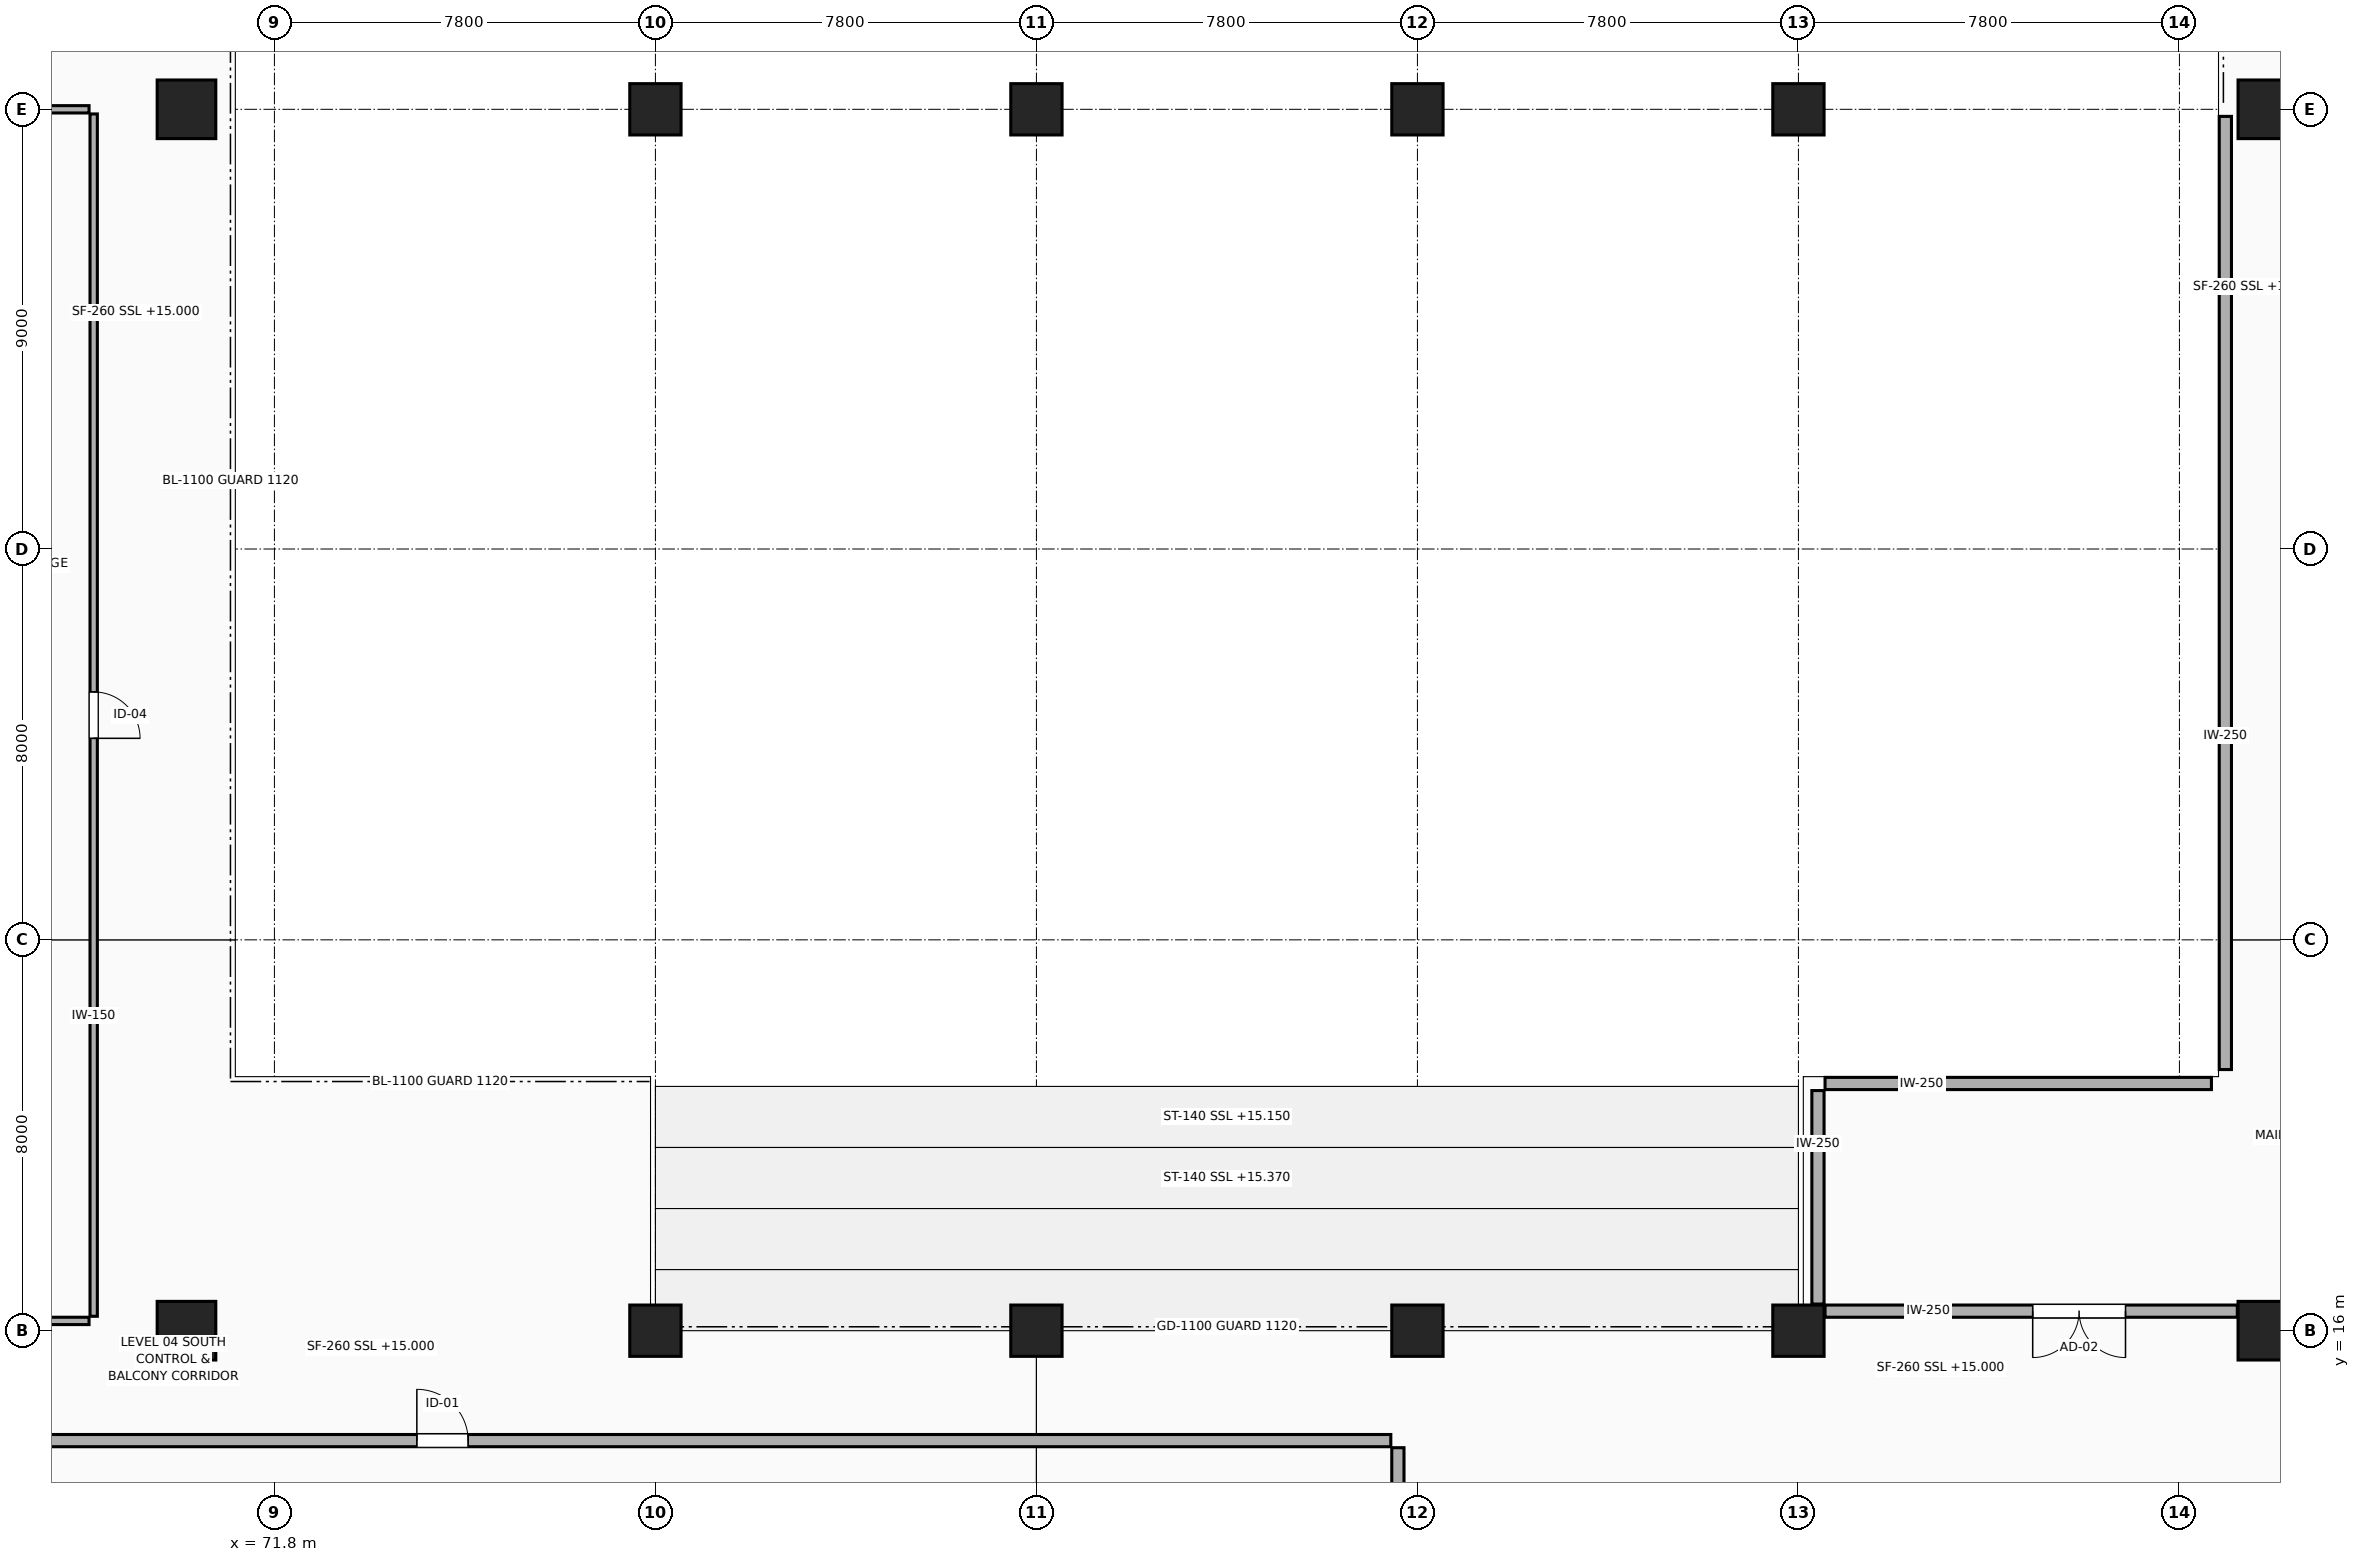
"""IFC4 building model, lengths in metres.
Left out: names, types, materials, properties, quantities, classifications, styles, units other than length and angle.
Written with IfcOpenShell. Run it as: python <this file> out.ifc"""

import sys

from ifc_helpers import new_model, si_unit, direction, frame, frame_2d, origin, origin_2d, place, context, subcontext, project, spatial, rectangle, extrude, element, fill, save


model = new_model("IFC4")
c1 = context("Model", 3, precision=1e-05, world=origin(), true_north=direction((0.0, 1.0)))
c2 = subcontext(c1, "Body", "Model", "MODEL_VIEW")
j1 = project(units=[si_unit("LENGTHUNIT", "METRE"), si_unit("PLANEANGLEUNIT", "RADIAN")], contexts=[c1])
p1 = place(None, origin())
s1 = spatial("IfcSite", under=j1, at=p1, CompositionType="ELEMENT")
p2 = place(p1, origin())
s2 = spatial("IfcBuilding", under=s1, at=p2, CompositionType="ELEMENT")
p3 = place(p2, frame((0.0, 0.0, 15.0)))
s3 = spatial("IfcBuildingStorey", under=s2, at=p3, CompositionType="ELEMENT", Elevation=15.0)
for number, where, z_axis, x_axis in (
    (1, (70.0, 16.0, 0.0), (0.0, 0.0, 1.0), (1.0, 0.0, 0.0)),
    (2, (70.0, 41.0, 0.0), (0.0, 0.0, 1.0), (1.0, 0.0, 0.0)),
):
    element("IfcColumn", number, at=place(p3, frame(where, z_axis=z_axis, x_axis=x_axis)), inside=s3, PredefinedType="COLUMN", context=c2, shape_type="SweptSolid", body=[
        extrude(rectangle(XDim=1.2, YDim=1.2, at=origin_2d()), origin(), (0.0, 0.0, 1.0), 4.8),
    ])
for number, where, z_axis, x_axis in (
    (3, (79.6, 16.0, 0.0), (0.0, 0.0, 1.0), (1.0, 0.0, 0.0)),
    (4, (79.6, 41.0, 0.0), (0.0, 0.0, 1.0), (1.0, 0.0, 0.0)),
    (5, (87.4, 16.0, 0.0), (0.0, 0.0, 1.0), (1.0, 0.0, 0.0)),
    (6, (87.4, 41.0, 0.0), (0.0, 0.0, 1.0), (1.0, 0.0, 0.0)),
    (7, (95.2, 16.0, 0.0), (0.0, 0.0, 1.0), (1.0, 0.0, 0.0)),
    (8, (95.2, 41.0, 0.0), (0.0, 0.0, 1.0), (1.0, 0.0, 0.0)),
    (9, (103.0, 16.0, 0.0), (0.0, 0.0, 1.0), (1.0, 0.0, 0.0)),
    (10, (103.0, 41.0, 0.0), (0.0, 0.0, 1.0), (1.0, 0.0, 0.0)),
):
    element("IfcColumn", number, at=place(p3, frame(where, z_axis=z_axis, x_axis=x_axis)), inside=s3, PredefinedType="COLUMN", context=c2, shape_type="SweptSolid", body=[
        extrude(rectangle(XDim=1.05, YDim=1.05, at=origin_2d()), origin(), (0.0, 0.0, 1.0), 4.8),
    ])
for number, where, z_axis, x_axis in (
    (11, (112.6, 16.0, 0.0), (0.0, 0.0, 1.0), (1.0, 0.0, 0.0)),
    (12, (112.6, 41.0, 0.0), (0.0, 0.0, 1.0), (1.0, 0.0, 0.0)),
):
    element("IfcColumn", number, at=place(p3, frame(where, z_axis=z_axis, x_axis=x_axis)), inside=s3, PredefinedType="COLUMN", context=c2, shape_type="SweptSolid", body=[
        extrude(rectangle(XDim=1.2, YDim=1.2, at=origin_2d()), origin(), (0.0, 0.0, 1.0), 4.8),
    ])
p4 = place(p3, frame((111.985, 16.4, 0.0), z_axis=(0.0, 0.0, 1.0), x_axis=(-1.0, 0.0, 0.0)))
e13 = element("IfcWall", 13, at=p4, inside=s3, PredefinedType="PARTITIONING", context=c2, shape_type="SweptSolid", body=[
    extrude(rectangle(XDim=8.44, YDim=0.25, at=frame_2d((4.22, 0.0))), origin(), (0.0, 0.0, 1.0), 3.68),
])
p5 = place(p4, frame((2.289, 0.0, 0.0)))
e14 = element("IfcOpeningElement", 14, at=p5, cuts=e13, PredefinedType="OPENING", context=c2, shape_type="SweptSolid", body=[
    extrude(rectangle(XDim=1.9, YDim=2.35, at=frame_2d((0.95, 1.175))), frame((0.0, 0.135, 0.0), z_axis=(0.0, -1.0, 0.0), x_axis=(1.0, 0.0, 0.0)), (0.0, 0.0, 1.0), 0.27),
])
p6 = place(p3, frame((103.4, 16.545, 0.0), z_axis=(0.0, 0.0, 1.0), x_axis=(0.0, 1.0, 0.0)))
e15 = element("IfcWall", 15, at=p6, inside=s3, PredefinedType="PARTITIONING", context=c2, shape_type="SweptSolid", body=[
    extrude(rectangle(XDim=4.37, YDim=0.25, at=frame_2d((2.185, 0.0))), origin(), (0.0, 0.0, 1.0), 4.54),
])
p7 = place(p3, frame((103.545, 21.06, 0.0), z_axis=(0.0, 0.0, 1.0), x_axis=(1.0, 0.0, 0.0)))
e16 = element("IfcWall", 16, at=p7, inside=s3, PredefinedType="PARTITIONING", context=c2, shape_type="SweptSolid", body=[
    extrude(rectangle(XDim=7.91, YDim=0.25, at=frame_2d((3.955, 0.0))), origin(), (0.0, 0.0, 1.0), 4.54),
])
p8 = place(p3, frame((111.74, 21.345, 0.0), z_axis=(0.0, 0.0, 1.0), x_axis=(0.0, 1.0, 0.0)))
e17 = element("IfcWall", 17, at=p8, inside=s3, PredefinedType="PARTITIONING", context=c2, shape_type="SweptSolid", body=[
    extrude(rectangle(XDim=19.51, YDim=0.25, at=frame_2d((9.755, 0.0))), origin(), (0.0, 0.0, 1.0), 4.54),
])
p9 = place(p3, frame((94.8, 13.605, 0.0), z_axis=(0.0, 0.0, 1.0), x_axis=(0.0, -1.0, 0.0)))
e18 = element("IfcWall", 18, at=p9, inside=s3, PredefinedType="PARTITIONING", context=c2, shape_type="SweptSolid", body=[
    extrude(rectangle(XDim=3.231, YDim=0.25, at=frame_2d((1.615, 0.0))), origin(), (0.0, 0.0, 1.0), 4.54),
])
p10 = place(p3, frame((64.374, 13.75, 0.0), z_axis=(0.0, 0.0, 1.0), x_axis=(1.0, 0.0, 0.0)))
e19 = element("IfcWall", 19, at=p10, inside=s3, PredefinedType="PARTITIONING", context=c2, shape_type="SweptSolid", body=[
    extrude(rectangle(XDim=30.281, YDim=0.25, at=frame_2d((15.141, 0.0))), origin(), (0.0, 0.0, 1.0), 4.54),
])
p11 = place(p10, frame((10.342, 0.0, 0.0)))
e20 = element("IfcOpeningElement", 20, at=p11, cuts=e19, PredefinedType="OPENING", context=c2, shape_type="SweptSolid", body=[
    extrude(rectangle(XDim=1.05, YDim=2.15, at=frame_2d((0.525, 1.075))), frame((0.0, 0.135, 0.0), z_axis=(0.0, -1.0, 0.0), x_axis=(1.0, 0.0, 0.0)), (0.0, 0.0, 1.0), 0.27),
])
p12 = place(p3, frame((68.1, 40.905, 0.0), z_axis=(0.0, 0.0, 1.0), x_axis=(0.0, -1.0, 0.0)))
e21 = element("IfcWall", 21, at=p12, inside=s3, PredefinedType="PARTITIONING", context=c2, shape_type="SweptSolid", body=[
    extrude(rectangle(XDim=24.61, YDim=0.15, at=frame_2d((12.305, 0.0))), origin(), (0.0, 0.0, 1.0), 4.54),
])
p13 = place(p12, frame((11.83, 0.0, 0.0)))
e22 = element("IfcOpeningElement", 22, at=p13, cuts=e21, PredefinedType="OPENING", context=c2, shape_type="SweptSolid", body=[
    extrude(rectangle(XDim=0.95, YDim=2.15, at=frame_2d((0.475, 1.075))), frame((0.0, 0.085, 0.0), z_axis=(0.0, -1.0, 0.0), x_axis=(1.0, 0.0, 0.0)), (0.0, 0.0, 1.0), 0.17),
])
p14 = place(p3, frame((68.005, 16.2, 0.0), z_axis=(0.0, 0.0, 1.0), x_axis=(-1.0, 0.0, 0.0)))
e23 = element("IfcWall", 23, at=p14, inside=s3, PredefinedType="PARTITIONING", context=c2, shape_type="SweptSolid", body=[
    extrude(rectangle(XDim=4.121, YDim=0.15, at=frame_2d((2.061, 0.0))), origin(), (0.0, 0.0, 1.0), 3.93),
])
p15 = place(p3, frame((64.495, 41.0, 0.0), z_axis=(0.0, 0.0, 1.0), x_axis=(1.0, 0.0, 0.0)))
e24 = element("IfcWall", 24, at=p15, inside=s3, PredefinedType="PARTITIONING", context=c2, shape_type="SweptSolid", body=[
    extrude(rectangle(XDim=3.51, YDim=0.15, at=frame_2d((1.755, 0.0))), origin(), (0.0, 0.0, 1.0), 3.98),
])
p16 = place(p15, frame((0.855, 0.0, 0.0)))
e25 = element("IfcOpeningElement", 25, at=p16, cuts=e24, PredefinedType="OPENING", context=c2, shape_type="SweptSolid", body=[
    extrude(rectangle(XDim=1.8, YDim=2.15, at=frame_2d((0.9, 1.075))), frame((0.0, 0.085, 0.0), z_axis=(0.0, -1.0, 0.0), x_axis=(1.0, 0.0, 0.0)), (0.0, 0.0, 1.0), 0.17),
])
p17 = place(p5, origin())
e26 = element("IfcDoor", 26, at=p17, inside=s3, OperationType="DOUBLE_SWING_RIGHT", PredefinedType="DOOR", context=c2, shape_type="SweptSolid", body=[
    extrude(rectangle(XDim=1.9, YDim=2.35, at=frame_2d((0.95, 1.175))), frame((0.0, 0.025, 0.0), z_axis=(0.0, -1.0, 0.0), x_axis=(1.0, 0.0, 0.0)), (0.0, 0.0, 1.0), 0.05),
])
fill(e14, e26)
p18 = place(p11, origin())
e27 = element("IfcDoor", 27, at=p18, inside=s3, OperationType="SINGLE_SWING_LEFT", PredefinedType="DOOR", context=c2, shape_type="SweptSolid", body=[
    extrude(rectangle(XDim=1.05, YDim=2.15, at=frame_2d((0.525, 1.075))), frame((0.0, 0.025, 0.0), z_axis=(0.0, -1.0, 0.0), x_axis=(1.0, 0.0, 0.0)), (0.0, 0.0, 1.0), 0.05),
])
fill(e20, e27)
p19 = place(p13, origin())
e28 = element("IfcDoor", 28, at=p19, inside=s3, OperationType="SINGLE_SWING_RIGHT", PredefinedType="DOOR", context=c2, shape_type="SweptSolid", body=[
    extrude(rectangle(XDim=0.95, YDim=2.15, at=frame_2d((0.475, 1.075))), frame((0.0, 0.025, 0.0), z_axis=(0.0, -1.0, 0.0), x_axis=(1.0, 0.0, 0.0)), (0.0, 0.0, 1.0), 0.05),
])
fill(e22, e28)
save(model, sys.argv[1])
